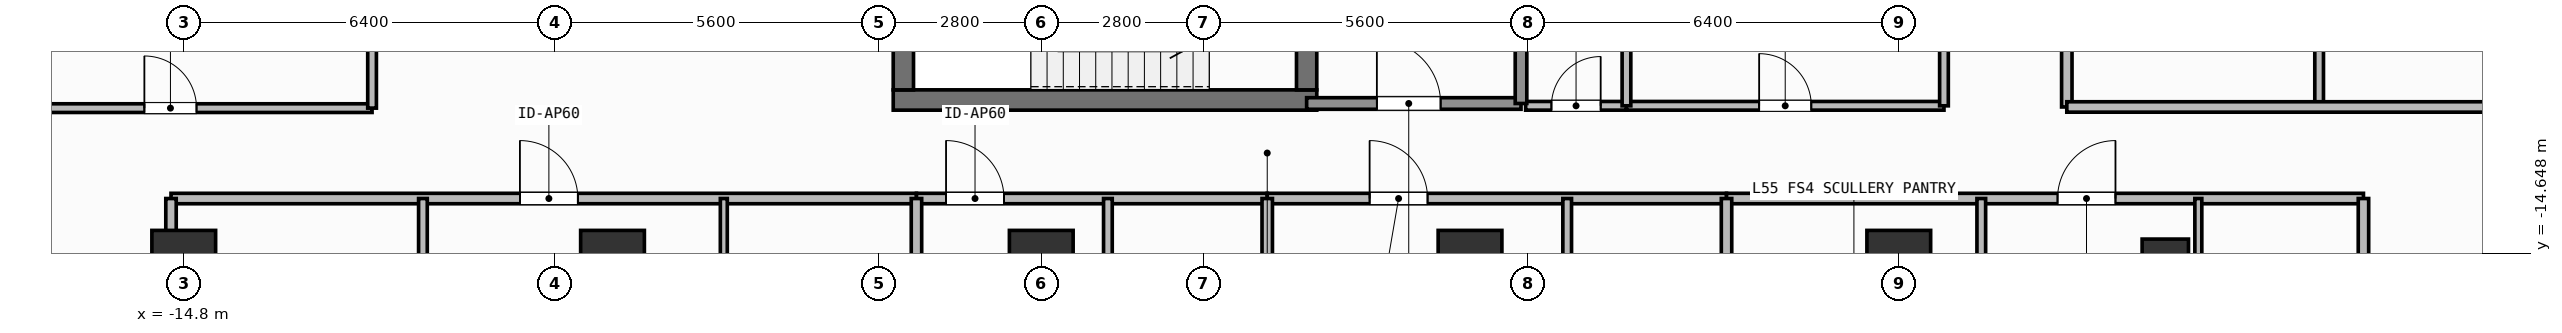
"""IFC4 building model, lengths in metres.
Left out: names, types, materials, properties, quantities, classifications, styles, units other than length and angle.
Written with IfcOpenShell. Run it as: python <this file> out.ifc"""

import sys

from ifc_helpers import new_model, si_unit, direction, frame, frame_2d, origin, origin_2d, place, context, subcontext, project, spatial, rectangle, hollow_rectangle, extrude, element, fill, save


model = new_model("IFC4")
c1 = context("Model", 3, precision=1e-05, world=origin(), true_north=direction((0.0, 1.0)))
c2 = subcontext(c1, "Body", "Model", "MODEL_VIEW")
j1 = project(units=[si_unit("LENGTHUNIT", "METRE"), si_unit("PLANEANGLEUNIT", "RADIAN")], contexts=[c1])
p1 = place(None, origin())
s1 = spatial("IfcSite", under=j1, at=p1, CompositionType="ELEMENT")
p2 = place(p1, origin())
s2 = spatial("IfcBuilding", under=s1, at=p2, CompositionType="ELEMENT")
p3 = place(p2, frame((0.0, 0.0, 223.5)))
s3 = spatial("IfcBuildingStorey", under=s2, at=p3, CompositionType="ELEMENT", Elevation=223.5)
p4 = place(p3, frame((-2.555, -12.0, 0.0), z_axis=(0.0, 0.0, 1.0), x_axis=(1.0, 0.0, 0.0)))
e1 = element("IfcWall", 1, at=p4, inside=s3, PredefinedType="SHEAR", context=c2, shape_type="SweptSolid", body=[
    extrude(rectangle(XDim=7.31, YDim=0.35, at=frame_2d((3.655, 0.0))), origin(), (0.0, 0.0, 1.0), 3.9),
])
p5 = place(p3, frame((-2.38, -11.825, 0.0), z_axis=(0.0, 0.0, 1.0), x_axis=(0.0, 1.0, 0.0)))
e2 = element("IfcWall", 2, at=p5, inside=s3, PredefinedType="SHEAR", context=c2, shape_type="SweptSolid", body=[
    extrude(rectangle(XDim=2.925, YDim=0.35, at=frame_2d((1.462, 0.0))), origin(), (0.0, 0.0, 1.0), 3.9),
])
p6 = place(p3, frame((4.58, -8.9, 0.0), z_axis=(0.0, 0.0, 1.0), x_axis=(0.0, -1.0, 0.0)))
e3 = element("IfcWall", 3, at=p6, inside=s3, PredefinedType="SHEAR", context=c2, shape_type="SweptSolid", body=[
    extrude(rectangle(XDim=2.925, YDim=0.35, at=frame_2d((1.462, 0.0))), origin(), (0.0, 0.0, 1.0), 3.9),
])
p7 = place(p6, frame((0.913, 0.0, 0.0)))
e4 = element("IfcOpeningElement", 4, at=p7, cuts=e3, PredefinedType="OPENING", context=c2, shape_type="SweptSolid", body=[
    extrude(rectangle(XDim=1.1, YDim=2.15, at=frame_2d((0.55, 1.075))), frame((0.0, 0.185, 0.0), z_axis=(0.0, -1.0, 0.0), x_axis=(1.0, 0.0, 0.0)), (0.0, 0.0, 1.0), 0.37),
])
for number, where, z_axis, x_axis in (
    (5, (-14.8, -14.8, 0.0), (0.0, 0.0, 1.0), (1.0, 0.0, 0.0)),
    (6, (-7.4, -14.8, 0.0), (0.0, 0.0, 1.0), (1.0, 0.0, 0.0)),
    (7, (0.0, -14.8, 0.0), (0.0, 0.0, 1.0), (1.0, 0.0, 0.0)),
    (8, (7.4, -14.8, 0.0), (0.0, 0.0, 1.0), (1.0, 0.0, 0.0)),
    (9, (14.8, -14.8, 0.0), (0.0, 0.0, 1.0), (1.0, 0.0, 0.0)),
):
    element("IfcColumn", number, at=place(p3, frame(where, z_axis=z_axis, x_axis=x_axis)), inside=s3, PredefinedType="COLUMN", context=c2, shape_type="SweptSolid", body=[
        extrude(rectangle(XDim=1.1, YDim=1.1, at=origin_2d()), origin(), (0.0, 0.0, 1.0), 3.9),
    ])
p8 = place(p3, frame((19.4, -14.8, 0.0), z_axis=(0.0, 0.0, 1.0), x_axis=(1.0, 0.0, 0.0)))
e10 = element("IfcColumn", 10, at=p8, inside=s3, PredefinedType="COLUMN", context=c2, shape_type="SweptSolid", body=[
    extrude(hollow_rectangle(XDim=0.8, YDim=0.8, WallThickness=0.036, at=origin_2d()), origin(), (0.0, 0.0, 1.0), 3.9),
])
p9 = place(p3, frame((4.58, -12.06, 0.0), z_axis=(0.0, 0.0, 1.0), x_axis=(1.0, 0.0, 0.0)))
e11 = element("IfcWall", 11, at=p9, inside=s3, PredefinedType="SOLIDWALL", context=c2, shape_type="SweptSolid", body=[
    extrude(rectangle(XDim=3.7, YDim=0.2, at=frame_2d((1.85, 0.0))), origin(), (0.0, 0.0, 1.0), 3.68),
])
p10 = place(p9, frame((1.212, 0.0, 0.0)))
e12 = element("IfcOpeningElement", 12, at=p10, cuts=e11, PredefinedType="OPENING", context=c2, shape_type="SweptSolid", body=[
    extrude(rectangle(XDim=1.1, YDim=2.15, at=frame_2d((0.55, 1.075))), frame((0.0, 0.11, 0.0), z_axis=(0.0, -1.0, 0.0), x_axis=(1.0, 0.0, 0.0)), (0.0, 0.0, 1.0), 0.22),
])
p11 = place(p3, frame((8.36, -12.1, 0.0), z_axis=(0.0, 0.0, 1.0), x_axis=(1.0, 0.0, 0.0)))
e13 = element("IfcWall", 13, at=p11, inside=s3, PredefinedType="PARTITIONING", context=c2, shape_type="SweptSolid", body=[
    extrude(rectangle(XDim=1.74, YDim=0.15, at=frame_2d((0.87, 0.0))), origin(), (0.0, 0.0, 1.0), 3.68),
])
p12 = place(p11, frame((0.445, 0.0, 0.0)))
e14 = element("IfcOpeningElement", 14, at=p12, cuts=e13, PredefinedType="OPENING", context=c2, shape_type="SweptSolid", body=[
    extrude(rectangle(XDim=0.85, YDim=2.1, at=frame_2d((0.425, 1.05))), frame((0.0, 0.085, 0.0), z_axis=(0.0, -1.0, 0.0), x_axis=(1.0, 0.0, 0.0)), (0.0, 0.0, 1.0), 0.17),
])
p13 = place(p3, frame((10.1, -12.1, 0.0), z_axis=(0.0, 0.0, 1.0), x_axis=(1.0, 0.0, 0.0)))
e15 = element("IfcWall", 15, at=p13, inside=s3, PredefinedType="PARTITIONING", context=c2, shape_type="SweptSolid", body=[
    extrude(rectangle(XDim=5.48, YDim=0.15, at=frame_2d((2.74, 0.0))), origin(), (0.0, 0.0, 1.0), 3.68),
])
p14 = place(p13, frame((2.29, 0.0, 0.0)))
e16 = element("IfcOpeningElement", 16, at=p14, cuts=e15, PredefinedType="OPENING", context=c2, shape_type="SweptSolid", body=[
    extrude(rectangle(XDim=0.9, YDim=2.1, at=frame_2d((0.45, 1.05))), frame((0.0, 0.085, 0.0), z_axis=(0.0, -1.0, 0.0), x_axis=(1.0, 0.0, 0.0)), (0.0, 0.0, 1.0), 0.17),
])
p15 = place(p3, frame((-15.02, -13.7, 0.0), z_axis=(0.0, 0.0, 1.0), x_axis=(1.0, 0.0, 0.0)))
e17 = element("IfcWall", 17, at=p15, inside=s3, PredefinedType="PARTITIONING", context=c2, shape_type="SweptSolid", body=[
    extrude(rectangle(XDim=12.866, YDim=0.18, at=frame_2d((6.433, 0.0))), origin(), (0.0, 0.0, 1.0), 3.68),
])
p16 = place(p15, frame((6.022, 0.0, 0.0)))
e18 = element("IfcOpeningElement", 18, at=p16, cuts=e17, PredefinedType="OPENING", context=c2, shape_type="SweptSolid", body=[
    extrude(rectangle(XDim=1.0, YDim=2.2, at=frame_2d((0.5, 1.1))), frame((0.0, 0.1, 0.0), z_axis=(0.0, -1.0, 0.0), x_axis=(1.0, 0.0, 0.0)), (0.0, 0.0, 1.0), 0.2),
])
p17 = place(p3, frame((-10.672, -18.19, 0.0), z_axis=(0.0, 0.0, 1.0), x_axis=(0.0, 1.0, 0.0)))
e19 = element("IfcWall", 19, at=p17, inside=s3, PredefinedType="PARTITIONING", context=c2, shape_type="SweptSolid", body=[
    extrude(rectangle(XDim=4.49, YDim=0.15, at=frame_2d((2.245, 0.0))), origin(), (0.0, 0.0, 1.0), 3.68),
])
p18 = place(p17, frame((1.907, 0.0, 0.0)))
e20 = element("IfcOpeningElement", 20, at=p18, cuts=e19, PredefinedType="OPENING", context=c2, shape_type="SweptSolid", body=[
    extrude(rectangle(XDim=0.85, YDim=2.1, at=frame_2d((0.425, 1.05))), frame((0.0, 0.085, 0.0), z_axis=(0.0, -1.0, 0.0), x_axis=(1.0, 0.0, 0.0)), (0.0, 0.0, 1.0), 0.17),
])
p19 = place(p3, frame((-5.479, -21.183, 0.0), z_axis=(0.0, 0.0, 1.0), x_axis=(0.0, 1.0, 0.0)))
e21 = element("IfcWall", 21, at=p19, inside=s3, PredefinedType="PARTITIONING", context=c2, shape_type="SweptSolid", body=[
    extrude(rectangle(XDim=7.483, YDim=0.12, at=frame_2d((3.742, 0.0))), origin(), (0.0, 0.0, 1.0), 3.68),
])
p20 = place(p19, frame((3.316, 0.0, 0.0)))
e22 = element("IfcOpeningElement", 22, at=p20, cuts=e21, PredefinedType="OPENING", context=c2, shape_type="SweptSolid", body=[
    extrude(rectangle(XDim=0.85, YDim=2.1, at=frame_2d((0.425, 1.05))), frame((0.0, 0.07, 0.0), z_axis=(0.0, -1.0, 0.0), x_axis=(1.0, 0.0, 0.0)), (0.0, 0.0, 1.0), 0.14),
])
p21 = place(p3, frame((-2.154, -13.7, 0.0), z_axis=(0.0, 0.0, 1.0), x_axis=(1.0, 0.0, 0.0)))
e23 = element("IfcWall", 23, at=p21, inside=s3, PredefinedType="PARTITIONING", context=c2, shape_type="SweptSolid", body=[
    extrude(rectangle(XDim=6.054, YDim=0.18, at=frame_2d((3.027, 0.0))), origin(), (0.0, 0.0, 1.0), 3.68),
])
p22 = place(p21, frame((0.511, 0.0, 0.0)))
e24 = element("IfcOpeningElement", 24, at=p22, cuts=e23, PredefinedType="OPENING", context=c2, shape_type="SweptSolid", body=[
    extrude(rectangle(XDim=1.0, YDim=2.2, at=frame_2d((0.5, 1.1))), frame((0.0, 0.1, 0.0), z_axis=(0.0, -1.0, 0.0), x_axis=(1.0, 0.0, 0.0)), (0.0, 0.0, 1.0), 0.2),
])
p23 = place(p3, frame((1.15, -19.579, 0.0), z_axis=(0.0, 0.0, 1.0), x_axis=(0.0, 1.0, 0.0)))
e25 = element("IfcWall", 25, at=p23, inside=s3, PredefinedType="PARTITIONING", context=c2, shape_type="SweptSolid", body=[
    extrude(rectangle(XDim=5.879, YDim=0.15, at=frame_2d((2.939, 0.0))), origin(), (0.0, 0.0, 1.0), 3.68),
])
p24 = place(p23, frame((2.602, 0.0, 0.0)))
e26 = element("IfcOpeningElement", 26, at=p24, cuts=e25, PredefinedType="OPENING", context=c2, shape_type="SweptSolid", body=[
    extrude(rectangle(XDim=0.85, YDim=2.1, at=frame_2d((0.425, 1.05))), frame((0.0, 0.085, 0.0), z_axis=(0.0, -1.0, 0.0), x_axis=(1.0, 0.0, 0.0)), (0.0, 0.0, 1.0), 0.17),
])
p25 = place(p3, frame((3.9, -13.7, 0.0), z_axis=(0.0, 0.0, 1.0), x_axis=(1.0, 0.0, 0.0)))
e27 = element("IfcWall", 27, at=p25, inside=s3, PredefinedType="PARTITIONING", context=c2, shape_type="SweptSolid", body=[
    extrude(rectangle(XDim=7.927, YDim=0.18, at=frame_2d((3.963, 0.0))), origin(), (0.0, 0.0, 1.0), 3.68),
])
p26 = place(p25, frame((1.767, 0.0, 0.0)))
e28 = element("IfcOpeningElement", 28, at=p26, cuts=e27, PredefinedType="OPENING", context=c2, shape_type="SweptSolid", body=[
    extrude(rectangle(XDim=1.0, YDim=2.2, at=frame_2d((0.5, 1.1))), frame((0.0, 0.1, 0.0), z_axis=(0.0, -1.0, 0.0), x_axis=(1.0, 0.0, 0.0)), (0.0, 0.0, 1.0), 0.2),
])
p27 = place(p3, frame((9.077, -19.579, 0.0), z_axis=(0.0, 0.0, 1.0), x_axis=(0.0, 1.0, 0.0)))
e29 = element("IfcWall", 29, at=p27, inside=s3, PredefinedType="PARTITIONING", context=c2, shape_type="SweptSolid", body=[
    extrude(rectangle(XDim=5.879, YDim=0.15, at=frame_2d((2.939, 0.0))), origin(), (0.0, 0.0, 1.0), 3.68),
])
p28 = place(p27, frame((2.95, 0.0, 0.0)))
e30 = element("IfcOpeningElement", 30, at=p28, cuts=e29, PredefinedType="OPENING", context=c2, shape_type="SweptSolid", body=[
    extrude(rectangle(XDim=0.85, YDim=2.1, at=frame_2d((0.425, 1.05))), frame((0.0, 0.085, 0.0), z_axis=(0.0, -1.0, 0.0), x_axis=(1.0, 0.0, 0.0)), (0.0, 0.0, 1.0), 0.17),
])
p29 = place(p3, frame((11.827, -13.7, 0.0), z_axis=(0.0, 0.0, 1.0), x_axis=(1.0, 0.0, 0.0)))
e31 = element("IfcWall", 31, at=p29, inside=s3, PredefinedType="PARTITIONING", context=c2, shape_type="SweptSolid", body=[
    extrude(rectangle(XDim=10.993, YDim=0.18, at=frame_2d((5.497, 0.0))), origin(), (0.0, 0.0, 1.0), 3.68),
])
p30 = place(p29, frame((5.713, 0.0, 0.0)))
e32 = element("IfcOpeningElement", 32, at=p30, cuts=e31, PredefinedType="OPENING", context=c2, shape_type="SweptSolid", body=[
    extrude(rectangle(XDim=1.0, YDim=2.2, at=frame_2d((0.5, 1.1))), frame((0.0, 0.1, 0.0), z_axis=(0.0, -1.0, 0.0), x_axis=(1.0, 0.0, 0.0)), (0.0, 0.0, 1.0), 0.2),
])
p31 = place(p3, frame((16.224, -18.19, 0.0), z_axis=(0.0, 0.0, 1.0), x_axis=(0.0, 1.0, 0.0)))
e33 = element("IfcWall", 33, at=p31, inside=s3, PredefinedType="PARTITIONING", context=c2, shape_type="SweptSolid", body=[
    extrude(rectangle(XDim=4.49, YDim=0.15, at=frame_2d((2.245, 0.0))), origin(), (0.0, 0.0, 1.0), 3.68),
])
p32 = place(p31, frame((1.907, 0.0, 0.0)))
e34 = element("IfcOpeningElement", 34, at=p32, cuts=e33, PredefinedType="OPENING", context=c2, shape_type="SweptSolid", body=[
    extrude(rectangle(XDim=0.85, YDim=2.1, at=frame_2d((0.425, 1.05))), frame((0.0, 0.085, 0.0), z_axis=(0.0, -1.0, 0.0), x_axis=(1.0, 0.0, 0.0)), (0.0, 0.0, 1.0), 0.17),
])
p33 = place(p3, frame((19.97, -21.183, 0.0), z_axis=(0.0, 0.0, 1.0), x_axis=(0.0, 1.0, 0.0)))
e35 = element("IfcWall", 35, at=p33, inside=s3, PredefinedType="PARTITIONING", context=c2, shape_type="SweptSolid", body=[
    extrude(rectangle(XDim=7.483, YDim=0.12, at=frame_2d((3.742, 0.0))), origin(), (0.0, 0.0, 1.0), 3.68),
])
p34 = place(p33, frame((3.316, 0.0, 0.0)))
e36 = element("IfcOpeningElement", 36, at=p34, cuts=e35, PredefinedType="OPENING", context=c2, shape_type="SweptSolid", body=[
    extrude(rectangle(XDim=0.85, YDim=2.1, at=frame_2d((0.425, 1.05))), frame((0.0, 0.07, 0.0), z_axis=(0.0, -1.0, 0.0), x_axis=(1.0, 0.0, 0.0)), (0.0, 0.0, 1.0), 0.14),
])
p35 = place(p3, frame((-18.33, -12.14, 0.0), z_axis=(0.0, 0.0, 1.0), x_axis=(1.0, 0.0, 0.0)))
e37 = element("IfcWall", 37, at=p35, inside=s3, PredefinedType="PARTITIONING", context=c2, shape_type="SweptSolid", body=[
    extrude(rectangle(XDim=6.78, YDim=0.15, at=frame_2d((3.39, 0.0))), origin(), (0.0, 0.0, 1.0), 3.68),
])
p36 = place(p35, frame((2.85, 0.0, 0.0)))
e38 = element("IfcOpeningElement", 38, at=p36, cuts=e37, PredefinedType="OPENING", context=c2, shape_type="SweptSolid", body=[
    extrude(rectangle(XDim=0.9, YDim=2.1, at=frame_2d((0.45, 1.05))), frame((0.0, 0.085, 0.0), z_axis=(0.0, -1.0, 0.0), x_axis=(1.0, 0.0, 0.0)), (0.0, 0.0, 1.0), 0.17),
])
p37 = place(p3, frame((17.7, -12.12, 0.0), z_axis=(0.0, 0.0, 1.0), x_axis=(0.0, 1.0, 0.0)))
e39 = element("IfcWall", 39, at=p37, inside=s3, PredefinedType="PARTITIONING", context=c2, shape_type="SweptSolid", body=[
    extrude(rectangle(XDim=23.55, YDim=0.18, at=frame_2d((11.775, 0.0))), origin(), (0.0, 0.0, 1.0), 3.68),
])
p38 = place(p37, frame((11.454, 0.0, 0.0)))
e40 = element("IfcOpeningElement", 40, at=p38, cuts=e39, PredefinedType="OPENING", context=c2, shape_type="SweptSolid", body=[
    extrude(rectangle(XDim=1.0, YDim=2.2, at=frame_2d((0.5, 1.1))), frame((0.0, 0.1, 0.0), z_axis=(0.0, -1.0, 0.0), x_axis=(1.0, 0.0, 0.0)), (0.0, 0.0, 1.0), 0.2),
])
p39 = place(p3, frame((8.28, -12.06, 0.0), z_axis=(0.0, 0.0, 1.0), x_axis=(0.0, 1.0, 0.0)))
e41 = element("IfcWall", 41, at=p39, inside=s3, PredefinedType="SOLIDWALL", context=c2, shape_type="SweptSolid", body=[
    extrude(rectangle(XDim=3.26, YDim=0.2, at=frame_2d((1.63, 0.0))), origin(), (0.0, 0.0, 1.0), 3.68),
])
p40 = place(p3, frame((10.1, -12.1, 0.0), z_axis=(0.0, 0.0, 1.0), x_axis=(0.0, 1.0, 0.0)))
e42 = element("IfcWall", 42, at=p40, inside=s3, PredefinedType="PARTITIONING", context=c2, shape_type="SweptSolid", body=[
    extrude(rectangle(XDim=2.35, YDim=0.15, at=frame_2d((1.175, 0.0))), origin(), (0.0, 0.0, 1.0), 3.68),
])
p41 = place(p3, frame((15.58, -12.1, 0.0), z_axis=(0.0, 0.0, 1.0), x_axis=(0.0, 1.0, 0.0)))
e43 = element("IfcWall", 43, at=p41, inside=s3, PredefinedType="PARTITIONING", context=c2, shape_type="SweptSolid", body=[
    extrude(rectangle(XDim=6.25, YDim=0.15, at=frame_2d((3.125, 0.0))), origin(), (0.0, 0.0, 1.0), 3.68),
])
for number, where, z_axis, x_axis in (
    (44, (-2.154, -28.63, 0.0), (0.0, 0.0, 1.0), (0.0, 1.0, 0.0)),
    (45, (3.9, -28.63, 0.0), (0.0, 0.0, 1.0), (0.0, 1.0, 0.0)),
    (46, (11.827, -28.63, 0.0), (0.0, 0.0, 1.0), (0.0, 1.0, 0.0)),
):
    element("IfcWall", number, at=place(p3, frame(where, z_axis=z_axis, x_axis=x_axis)), inside=s3, PredefinedType="PARTITIONING", context=c2, shape_type="SweptSolid", body=[
        extrude(rectangle(XDim=14.93, YDim=0.18, at=frame_2d((7.465, 0.0))), origin(), (0.0, 0.0, 1.0), 3.68),
    ])
for number, where, z_axis, x_axis in (
    (47, (-15.02, -27.51, 0.0), (0.0, 0.0, 1.0), (0.0, 1.0, 0.0)),
    (48, (22.82, -27.51, 0.0), (0.0, 0.0, 1.0), (0.0, 1.0, 0.0)),
):
    element("IfcWall", number, at=place(p3, frame(where, z_axis=z_axis, x_axis=x_axis)), inside=s3, PredefinedType="PARTITIONING", context=c2, shape_type="SweptSolid", body=[
        extrude(rectangle(XDim=13.81, YDim=0.18, at=frame_2d((6.905, 0.0))), origin(), (0.0, 0.0, 1.0), 3.68),
    ])
p42 = place(p3, frame((-11.55, -12.14, 0.0), z_axis=(0.0, 0.0, 1.0), x_axis=(0.0, 1.0, 0.0)))
e49 = element("IfcWall", 49, at=p42, inside=s3, PredefinedType="PARTITIONING", context=c2, shape_type="SweptSolid", body=[
    extrude(rectangle(XDim=16.24, YDim=0.15, at=frame_2d((8.12, 0.0))), origin(), (0.0, 0.0, 1.0), 3.68),
])
p43 = place(p3, frame((22.055, -12.12, 0.0), z_axis=(0.0, 0.0, 1.0), x_axis=(0.0, 1.0, 0.0)))
e50 = element("IfcWall", 50, at=p43, inside=s3, PredefinedType="PARTITIONING", context=c2, shape_type="SweptSolid", body=[
    extrude(rectangle(XDim=6.708, YDim=0.15, at=frame_2d((3.354, 0.0))), origin(), (0.0, 0.0, 1.0), 3.68),
])
p44 = place(p3, frame((17.7, -12.12, 0.0), z_axis=(0.0, 0.0, 1.0), x_axis=(1.0, 0.0, 0.0)))
e51 = element("IfcWall", 51, at=p44, inside=s3, PredefinedType="PARTITIONING", context=c2, shape_type="SweptSolid", body=[
    extrude(rectangle(XDim=8.43, YDim=0.18, at=frame_2d((4.215, 0.0))), origin(), (0.0, 0.0, 1.0), 3.68),
])
p45 = place(p10, origin())
e52 = element("IfcDoor", 52, at=p45, inside=s3, OperationType="SINGLE_SWING_LEFT", PredefinedType="DOOR", context=c2, shape_type="SweptSolid", body=[
    extrude(rectangle(XDim=1.1, YDim=2.15, at=frame_2d((0.55, 1.075))), frame((0.0, 0.025, 0.0), z_axis=(0.0, -1.0, 0.0), x_axis=(1.0, 0.0, 0.0)), (0.0, 0.0, 1.0), 0.05),
])
fill(e12, e52)
p46 = place(p12, origin())
e53 = element("IfcDoor", 53, at=p46, inside=s3, OperationType="SINGLE_SWING_RIGHT", PredefinedType="DOOR", context=c2, shape_type="SweptSolid", body=[
    extrude(rectangle(XDim=0.85, YDim=2.1, at=frame_2d((0.425, 1.05))), frame((0.0, 0.025, 0.0), z_axis=(0.0, -1.0, 0.0), x_axis=(1.0, 0.0, 0.0)), (0.0, 0.0, 1.0), 0.05),
])
fill(e14, e53)
p47 = place(p14, origin())
e54 = element("IfcDoor", 54, at=p47, inside=s3, OperationType="SINGLE_SWING_LEFT", PredefinedType="DOOR", context=c2, shape_type="SweptSolid", body=[
    extrude(rectangle(XDim=0.9, YDim=2.1, at=frame_2d((0.45, 1.05))), frame((0.0, 0.025, 0.0), z_axis=(0.0, -1.0, 0.0), x_axis=(1.0, 0.0, 0.0)), (0.0, 0.0, 1.0), 0.05),
])
fill(e16, e54)
p48 = place(p16, origin())
e55 = element("IfcDoor", 55, at=p48, inside=s3, OperationType="SINGLE_SWING_LEFT", PredefinedType="DOOR", context=c2, shape_type="SweptSolid", body=[
    extrude(rectangle(XDim=1.0, YDim=2.2, at=frame_2d((0.5, 1.1))), frame((0.0, 0.025, 0.0), z_axis=(0.0, -1.0, 0.0), x_axis=(1.0, 0.0, 0.0)), (0.0, 0.0, 1.0), 0.05),
])
fill(e18, e55)
p49 = place(p22, origin())
e56 = element("IfcDoor", 56, at=p49, inside=s3, OperationType="SINGLE_SWING_LEFT", PredefinedType="DOOR", context=c2, shape_type="SweptSolid", body=[
    extrude(rectangle(XDim=1.0, YDim=2.2, at=frame_2d((0.5, 1.1))), frame((0.0, 0.025, 0.0), z_axis=(0.0, -1.0, 0.0), x_axis=(1.0, 0.0, 0.0)), (0.0, 0.0, 1.0), 0.05),
])
fill(e24, e56)
p50 = place(p26, origin())
e57 = element("IfcDoor", 57, at=p50, inside=s3, OperationType="SINGLE_SWING_LEFT", PredefinedType="DOOR", context=c2, shape_type="SweptSolid", body=[
    extrude(rectangle(XDim=1.0, YDim=2.2, at=frame_2d((0.5, 1.1))), frame((0.0, 0.025, 0.0), z_axis=(0.0, -1.0, 0.0), x_axis=(1.0, 0.0, 0.0)), (0.0, 0.0, 1.0), 0.05),
])
fill(e28, e57)
p51 = place(p30, origin())
e58 = element("IfcDoor", 58, at=p51, inside=s3, OperationType="SINGLE_SWING_RIGHT", PredefinedType="DOOR", context=c2, shape_type="SweptSolid", body=[
    extrude(rectangle(XDim=1.0, YDim=2.2, at=frame_2d((0.5, 1.1))), frame((0.0, 0.025, 0.0), z_axis=(0.0, -1.0, 0.0), x_axis=(1.0, 0.0, 0.0)), (0.0, 0.0, 1.0), 0.05),
])
fill(e32, e58)
p52 = place(p36, origin())
e59 = element("IfcDoor", 59, at=p52, inside=s3, OperationType="SINGLE_SWING_LEFT", PredefinedType="DOOR", context=c2, shape_type="SweptSolid", body=[
    extrude(rectangle(XDim=0.9, YDim=2.1, at=frame_2d((0.45, 1.05))), frame((0.0, 0.025, 0.0), z_axis=(0.0, -1.0, 0.0), x_axis=(1.0, 0.0, 0.0)), (0.0, 0.0, 1.0), 0.05),
])
fill(e38, e59)
save(model, sys.argv[1])
